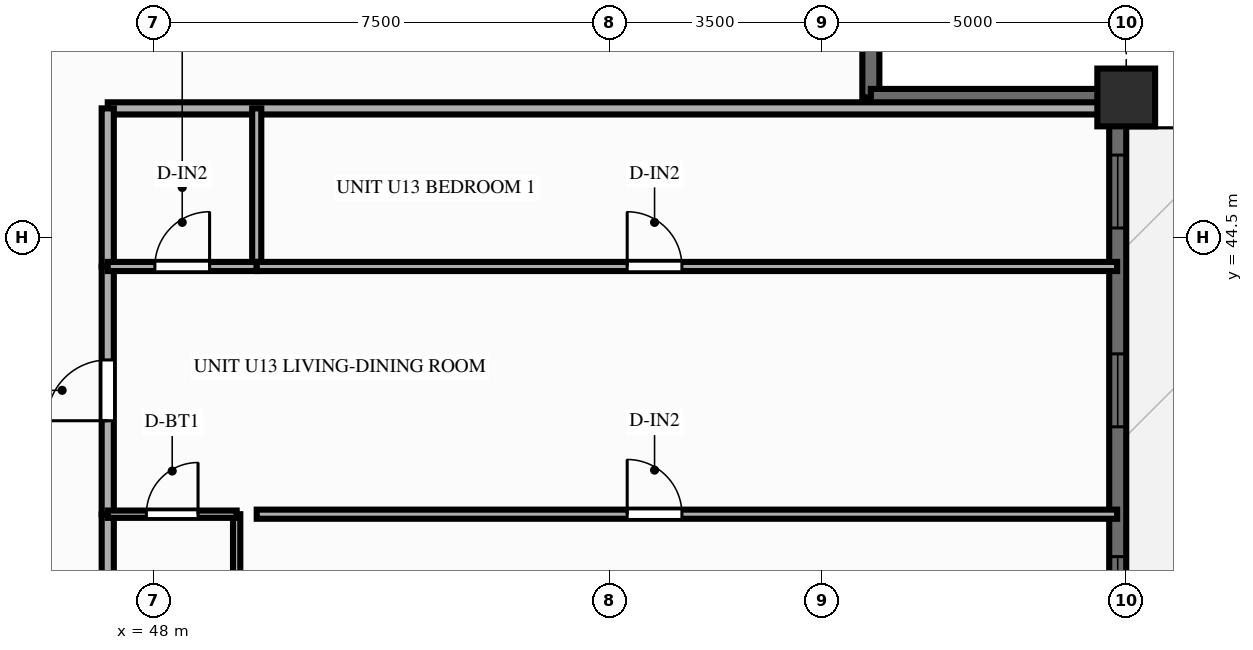
"""IFC4 building model, lengths in metres.
Left out: names, types, materials, properties, quantities, classifications, styles, units other than length and angle.
Written with IfcOpenShell. Run it as: python <this file> out.ifc"""

import sys

from ifc_helpers import new_model, si_unit, direction, frame, frame_2d, origin, origin_2d, place, context, subcontext, project, spatial, rectangle, extrude, source, transform, mapped, element, fill, save


model = new_model("IFC4")
c1 = context("Model", 3, precision=1e-05, world=origin(), true_north=direction((0.0, 1.0)))
c2 = subcontext(c1, "Body", "Model", "MODEL_VIEW")
j1 = project(units=[si_unit("LENGTHUNIT", "METRE"), si_unit("PLANEANGLEUNIT", "RADIAN")], contexts=[c1])
p1 = place(None, origin())
s1 = spatial("IfcSite", under=j1, at=p1, CompositionType="ELEMENT")
p2 = place(p1, origin())
s2 = spatial("IfcBuilding", under=s1, at=p2, CompositionType="ELEMENT")
p3 = place(p2, frame((0.0, 0.0, 104.85)))
s3 = spatial("IfcBuildingStorey", under=s2, at=p3, CompositionType="ELEMENT", Elevation=104.85)
m1 = source(origin(), c2, "Body", "SweptSolid", [
    extrude(rectangle(XDim=0.95, YDim=0.95, at=origin_2d()), origin(), (0.0, 0.0, 1.0), 3.0),
])
p4 = place(p3, frame((64.0, 46.8, 0.0), z_axis=(0.0, 0.0, 1.0), x_axis=(1.0, 0.0, 0.0)))
e1 = element("IfcColumn", 1, at=p4, inside=s3, PredefinedType="COLUMN", context=c2, shape_type="MappedRepresentation", body=[
    mapped(m1, transform((0.0, 0.0, 0.0), scale=1.0)),
])
p5 = place(p3, frame((63.86, 7.2, 0.0), z_axis=(0.0, 0.0, 1.0), x_axis=(0.0, 1.0, 0.0)))
e2 = element("IfcWall", 2, at=p5, inside=s3, PredefinedType="SOLIDWALL", context=c2, shape_type="SweptSolid", body=[
    extrude(rectangle(XDim=39.6, YDim=0.28, at=frame_2d((19.8, 0.0))), origin(), (0.0, 0.0, 1.0), 2.28),
])
p6 = place(p5, frame((0.945, 0.0, 0.25)))
e3 = element("IfcOpeningElement", 3, at=p6, cuts=e2, PredefinedType="OPENING", context=c2, shape_type="SweptSolid", body=[
    extrude(rectangle(XDim=1.2, YDim=1.5, at=frame_2d((0.6, 0.75))), frame((0.0, 0.152, 0.0), z_axis=(0.0, -1.0, 0.0), x_axis=(1.0, 0.0, 0.0)), (0.0, 0.0, 1.0), 0.304),
])
p7 = place(p5, frame((4.213, 0.0, 0.25)))
e4 = element("IfcOpeningElement", 4, at=p7, cuts=e2, PredefinedType="OPENING", context=c2, shape_type="SweptSolid", body=[
    extrude(rectangle(XDim=1.2, YDim=1.5, at=frame_2d((0.6, 0.75))), frame((0.0, 0.152, 0.0), z_axis=(0.0, -1.0, 0.0), x_axis=(1.0, 0.0, 0.0)), (0.0, 0.0, 1.0), 0.304),
])
p8 = place(p5, frame((7.55, 0.0, 0.25)))
e5 = element("IfcOpeningElement", 5, at=p8, cuts=e2, PredefinedType="OPENING", context=c2, shape_type="SweptSolid", body=[
    extrude(rectangle(XDim=1.2, YDim=1.5, at=frame_2d((0.6, 0.75))), frame((0.0, 0.152, 0.0), z_axis=(0.0, -1.0, 0.0), x_axis=(1.0, 0.0, 0.0)), (0.0, 0.0, 1.0), 0.304),
])
p9 = place(p5, frame((13.483, 0.0, 0.25)))
e6 = element("IfcOpeningElement", 6, at=p9, cuts=e2, PredefinedType="OPENING", context=c2, shape_type="SweptSolid", body=[
    extrude(rectangle(XDim=1.2, YDim=1.5, at=frame_2d((0.6, 0.75))), frame((0.0, 0.152, 0.0), z_axis=(0.0, -1.0, 0.0), x_axis=(1.0, 0.0, 0.0)), (0.0, 0.0, 1.0), 0.304),
])
p10 = place(p5, frame((16.82, 0.0, 0.25)))
e7 = element("IfcOpeningElement", 7, at=p10, cuts=e2, PredefinedType="OPENING", context=c2, shape_type="SweptSolid", body=[
    extrude(rectangle(XDim=1.2, YDim=1.5, at=frame_2d((0.6, 0.75))), frame((0.0, 0.152, 0.0), z_axis=(0.0, -1.0, 0.0), x_axis=(1.0, 0.0, 0.0)), (0.0, 0.0, 1.0), 0.304),
])
p11 = place(p5, frame((19.2, 0.0, 0.25)))
e8 = element("IfcOpeningElement", 8, at=p11, cuts=e2, PredefinedType="OPENING", context=c2, shape_type="SweptSolid", body=[
    extrude(rectangle(XDim=1.2, YDim=1.5, at=frame_2d((0.6, 0.75))), frame((0.0, 0.152, 0.0), z_axis=(0.0, -1.0, 0.0), x_axis=(1.0, 0.0, 0.0)), (0.0, 0.0, 1.0), 0.304),
])
p12 = place(p5, frame((21.578, 0.0, 0.25)))
e9 = element("IfcOpeningElement", 9, at=p12, cuts=e2, PredefinedType="OPENING", context=c2, shape_type="SweptSolid", body=[
    extrude(rectangle(XDim=1.2, YDim=1.5, at=frame_2d((0.6, 0.75))), frame((0.0, 0.152, 0.0), z_axis=(0.0, -1.0, 0.0), x_axis=(1.0, 0.0, 0.0)), (0.0, 0.0, 1.0), 0.304),
])
p13 = place(p5, frame((26.313, 0.0, 0.0), z_axis=(0.0, 0.0, 1.0), x_axis=(-1.0, 0.0, 0.0)))
e10 = element("IfcOpeningElement", 10, at=p13, cuts=e2, PredefinedType="OPENING", context=c2, shape_type="SweptSolid", body=[
    extrude(rectangle(XDim=1.6, YDim=2.15, at=frame_2d((0.8, 1.075))), frame((0.0, 0.152, 0.0), z_axis=(0.0, -1.0, 0.0), x_axis=(1.0, 0.0, 0.0)), (0.0, 0.0, 1.0), 0.304),
])
p14 = place(p5, frame((29.305, 0.0, 0.25)))
e11 = element("IfcOpeningElement", 11, at=p14, cuts=e2, PredefinedType="OPENING", context=c2, shape_type="SweptSolid", body=[
    extrude(rectangle(XDim=0.7, YDim=1.5, at=frame_2d((0.35, 0.75))), frame((0.0, 0.152, 0.0), z_axis=(0.0, -1.0, 0.0), x_axis=(1.0, 0.0, 0.0)), (0.0, 0.0, 1.0), 0.304),
])
p15 = place(p5, frame((30.848, 0.0, 0.25)))
e12 = element("IfcOpeningElement", 12, at=p15, cuts=e2, PredefinedType="OPENING", context=c2, shape_type="SweptSolid", body=[
    extrude(rectangle(XDim=1.2, YDim=1.5, at=frame_2d((0.6, 0.75))), frame((0.0, 0.152, 0.0), z_axis=(0.0, -1.0, 0.0), x_axis=(1.0, 0.0, 0.0)), (0.0, 0.0, 1.0), 0.304),
])
p16 = place(p5, frame((34.183, 0.0, 0.25)))
e13 = element("IfcOpeningElement", 13, at=p16, cuts=e2, PredefinedType="OPENING", context=c2, shape_type="SweptSolid", body=[
    extrude(rectangle(XDim=1.2, YDim=1.5, at=frame_2d((0.6, 0.75))), frame((0.0, 0.152, 0.0), z_axis=(0.0, -1.0, 0.0), x_axis=(1.0, 0.0, 0.0)), (0.0, 0.0, 1.0), 0.304),
])
p17 = place(p5, frame((37.452, 0.0, 0.25)))
e14 = element("IfcOpeningElement", 14, at=p17, cuts=e2, PredefinedType="OPENING", context=c2, shape_type="SweptSolid", body=[
    extrude(rectangle(XDim=1.2, YDim=1.5, at=frame_2d((0.6, 0.75))), frame((0.0, 0.152, 0.0), z_axis=(0.0, -1.0, 0.0), x_axis=(1.0, 0.0, 0.0)), (0.0, 0.0, 1.0), 0.304),
])
for number, where, z_axis, x_axis in (
    (15, (59.8, 46.8, 0.0), (0.0, 0.0, 1.0), (0.0, 1.0, 0.0)),
    (16, (59.8, 46.8, 0.0), (0.0, 0.0, 1.0), (1.0, 0.0, 0.0)),
):
    element("IfcWall", number, at=place(p3, frame(where, z_axis=z_axis, x_axis=x_axis)), inside=s3, PredefinedType="SOLIDWALL", context=c2, shape_type="SweptSolid", body=[
        extrude(rectangle(XDim=4.12, YDim=0.28, at=frame_2d((2.06, 0.0))), origin(), (0.0, 0.0, 1.0), 2.28),
    ])
p18 = place(p3, frame((47.25, 46.62, 0.0), z_axis=(0.0, 0.0, 1.0), x_axis=(1.0, 0.0, 0.0)))
e17 = element("IfcWall", 17, at=p18, inside=s3, PredefinedType="PARTITIONING", context=c2, shape_type="SweptSolid", body=[
    extrude(rectangle(XDim=16.6, YDim=0.2, at=frame_2d((8.3, 0.0))), origin(), (0.0, 0.0, 1.0), 2.79),
])
p19 = place(p3, frame((47.25, 37.35, 0.0), z_axis=(0.0, 0.0, 1.0), x_axis=(0.0, 1.0, 0.0)))
e18 = element("IfcWall", 18, at=p19, inside=s3, PredefinedType="PARTITIONING", context=c2, shape_type="SweptSolid", body=[
    extrude(rectangle(XDim=2.595, YDim=0.2, at=frame_2d((1.298, 0.0))), origin(), (0.0, 0.0, 1.0), 2.79),
])
p20 = place(p3, frame((47.25, 39.946, 0.0), z_axis=(0.0, 0.0, 1.0), x_axis=(0.0, 1.0, 0.0)))
e19 = element("IfcWall", 19, at=p20, inside=s3, PredefinedType="PARTITIONING", context=c2, shape_type="SweptSolid", body=[
    extrude(rectangle(XDim=4.074, YDim=0.2, at=frame_2d((2.037, 0.0))), origin(), (0.0, 0.0, 1.0), 2.79),
])
p21 = place(p20, frame((1.537, 0.0, 0.0)))
e20 = element("IfcOpeningElement", 20, at=p21, cuts=e19, PredefinedType="OPENING", context=c2, shape_type="SweptSolid", body=[
    extrude(rectangle(XDim=1.0, YDim=2.15, at=frame_2d((0.5, 1.075))), frame((0.0, 0.112, 0.0), z_axis=(0.0, -1.0, 0.0), x_axis=(1.0, 0.0, 0.0)), (0.0, 0.0, 1.0), 0.224),
])
p22 = place(p3, frame((47.25, 44.02, 0.0), z_axis=(0.0, 0.0, 1.0), x_axis=(0.0, 1.0, 0.0)))
e21 = element("IfcWall", 21, at=p22, inside=s3, PredefinedType="PARTITIONING", context=c2, shape_type="SweptSolid", body=[
    extrude(rectangle(XDim=2.6, YDim=0.2, at=frame_2d((1.3, 0.0))), origin(), (0.0, 0.0, 1.0), 2.79),
])
p23 = place(p3, frame((49.37, 37.35, 0.0), z_axis=(0.0, 0.0, 1.0), x_axis=(0.0, 1.0, 0.0)))
e22 = element("IfcWall", 22, at=p23, inside=s3, PredefinedType="PARTITIONING", context=c2, shape_type="SweptSolid", body=[
    extrude(rectangle(XDim=2.595, YDim=0.12, at=frame_2d((1.298, 0.0))), origin(), (0.0, 0.0, 1.0), 2.79),
])
p24 = place(p3, frame((49.7, 44.02, 0.0), z_axis=(0.0, 0.0, 1.0), x_axis=(0.0, 1.0, 0.0)))
e23 = element("IfcWall", 23, at=p24, inside=s3, PredefinedType="PARTITIONING", context=c2, shape_type="SweptSolid", body=[
    extrude(rectangle(XDim=2.6, YDim=0.15, at=frame_2d((1.3, 0.0))), origin(), (0.0, 0.0, 1.0), 2.79),
])
p25 = place(p3, frame((47.25, 39.946, 0.0), z_axis=(0.0, 0.0, 1.0), x_axis=(1.0, 0.0, 0.0)))
e24 = element("IfcWall", 24, at=p25, inside=s3, PredefinedType="PARTITIONING", context=c2, shape_type="SweptSolid", body=[
    extrude(rectangle(XDim=2.12, YDim=0.12, at=frame_2d((1.06, 0.0))), origin(), (0.0, 0.0, 1.0), 2.79),
])
p26 = place(p25, frame((0.635, 0.0, 0.0)))
e25 = element("IfcOpeningElement", 25, at=p26, cuts=e24, PredefinedType="OPENING", context=c2, shape_type="SweptSolid", body=[
    extrude(rectangle(XDim=0.85, YDim=2.05, at=frame_2d((0.425, 1.025))), frame((0.0, 0.072, 0.0), z_axis=(0.0, -1.0, 0.0), x_axis=(1.0, 0.0, 0.0)), (0.0, 0.0, 1.0), 0.144),
])
p27 = place(p3, frame((49.7, 39.946, 0.0), z_axis=(0.0, 0.0, 1.0), x_axis=(1.0, 0.0, 0.0)))
e26 = element("IfcWall", 26, at=p27, inside=s3, PredefinedType="PARTITIONING", context=c2, shape_type="SweptSolid", body=[
    extrude(rectangle(XDim=14.15, YDim=0.15, at=frame_2d((7.075, 0.0))), origin(), (0.0, 0.0, 1.0), 2.79),
])
p28 = place(p27, frame((6.093, 0.0, 0.0)))
e27 = element("IfcOpeningElement", 27, at=p28, cuts=e26, PredefinedType="OPENING", context=c2, shape_type="SweptSolid", body=[
    extrude(rectangle(XDim=0.9, YDim=2.1, at=frame_2d((0.45, 1.05))), frame((0.0, 0.087, 0.0), z_axis=(0.0, -1.0, 0.0), x_axis=(1.0, 0.0, 0.0)), (0.0, 0.0, 1.0), 0.174),
])
p29 = place(p3, frame((47.25, 44.02, 0.0), z_axis=(0.0, 0.0, 1.0), x_axis=(1.0, 0.0, 0.0)))
e28 = element("IfcWall", 28, at=p29, inside=s3, PredefinedType="PARTITIONING", context=c2, shape_type="SweptSolid", body=[
    extrude(rectangle(XDim=2.45, YDim=0.15, at=frame_2d((1.225, 0.0))), origin(), (0.0, 0.0, 1.0), 2.79),
])
p30 = place(p29, frame((0.775, 0.0, 0.0)))
e29 = element("IfcOpeningElement", 29, at=p30, cuts=e28, PredefinedType="OPENING", context=c2, shape_type="SweptSolid", body=[
    extrude(rectangle(XDim=0.9, YDim=2.1, at=frame_2d((0.45, 1.05))), frame((0.0, 0.087, 0.0), z_axis=(0.0, -1.0, 0.0), x_axis=(1.0, 0.0, 0.0)), (0.0, 0.0, 1.0), 0.174),
])
p31 = place(p3, frame((49.7, 44.02, 0.0), z_axis=(0.0, 0.0, 1.0), x_axis=(1.0, 0.0, 0.0)))
e30 = element("IfcWall", 30, at=p31, inside=s3, PredefinedType="PARTITIONING", context=c2, shape_type="SweptSolid", body=[
    extrude(rectangle(XDim=14.15, YDim=0.15, at=frame_2d((7.075, 0.0))), origin(), (0.0, 0.0, 1.0), 2.79),
])
p32 = place(p31, frame((6.093, 0.0, 0.0)))
e31 = element("IfcOpeningElement", 31, at=p32, cuts=e30, PredefinedType="OPENING", context=c2, shape_type="SweptSolid", body=[
    extrude(rectangle(XDim=0.9, YDim=2.1, at=frame_2d((0.45, 1.05))), frame((0.0, 0.087, 0.0), z_axis=(0.0, -1.0, 0.0), x_axis=(1.0, 0.0, 0.0)), (0.0, 0.0, 1.0), 0.174),
])
m2 = source(origin(), c2, "Body", "SweptSolid", [
    extrude(rectangle(XDim=1.2, YDim=1.5, at=frame_2d((0.6, 0.75))), frame((0.0, 0.03, 0.0), z_axis=(0.0, -1.0, 0.0), x_axis=(1.0, 0.0, 0.0)), (0.0, 0.0, 1.0), 0.06),
])
p33 = place(p15, origin())
e32 = element("IfcWindow", 32, at=p33, inside=s3, PartitioningType="SINGLE_PANEL", PredefinedType="WINDOW", context=c2, shape_type="MappedRepresentation", body=[
    mapped(m2, transform((0.0, 0.0, 0.0), scale=1.0)),
])
fill(e12, e32)
p34 = place(p16, origin())
e33 = element("IfcWindow", 33, at=p34, inside=s3, PartitioningType="SINGLE_PANEL", PredefinedType="WINDOW", context=c2, shape_type="MappedRepresentation", body=[
    mapped(m2, transform((0.0, 0.0, 0.0), scale=1.0)),
])
fill(e13, e33)
p35 = place(p17, origin())
e34 = element("IfcWindow", 34, at=p35, inside=s3, PartitioningType="SINGLE_PANEL", PredefinedType="WINDOW", context=c2, shape_type="MappedRepresentation", body=[
    mapped(m2, transform((0.0, 0.0, 0.0), scale=1.0)),
])
fill(e14, e34)
m3 = source(origin(), c2, "Body", "SweptSolid", [
    extrude(rectangle(XDim=1.0, YDim=2.15, at=frame_2d((0.5, 1.075))), frame((0.0, 0.025, 0.0), z_axis=(0.0, -1.0, 0.0), x_axis=(1.0, 0.0, 0.0)), (0.0, 0.0, 1.0), 0.05),
])
p36 = place(p21, origin())
e35 = element("IfcDoor", 35, at=p36, inside=s3, OperationType="SINGLE_SWING_LEFT", PredefinedType="DOOR", context=c2, shape_type="MappedRepresentation", body=[
    mapped(m3, transform((0.0, 0.0, 0.0), scale=1.0)),
])
fill(e20, e35)
m4 = source(origin(), c2, "Body", "SweptSolid", [
    extrude(rectangle(XDim=0.85, YDim=2.05, at=frame_2d((0.425, 1.025))), frame((0.0, 0.025, 0.0), z_axis=(0.0, -1.0, 0.0), x_axis=(1.0, 0.0, 0.0)), (0.0, 0.0, 1.0), 0.05),
])
p37 = place(p26, origin())
e36 = element("IfcDoor", 36, at=p37, inside=s3, OperationType="SINGLE_SWING_RIGHT", PredefinedType="DOOR", context=c2, shape_type="MappedRepresentation", body=[
    mapped(m4, transform((0.0, 0.0, 0.0), scale=1.0)),
])
fill(e25, e36)
m5 = source(origin(), c2, "Body", "SweptSolid", [
    extrude(rectangle(XDim=0.9, YDim=2.1, at=frame_2d((0.45, 1.05))), frame((0.0, 0.025, 0.0), z_axis=(0.0, -1.0, 0.0), x_axis=(1.0, 0.0, 0.0)), (0.0, 0.0, 1.0), 0.05),
])
p38 = place(p28, origin())
e37 = element("IfcDoor", 37, at=p38, inside=s3, OperationType="SINGLE_SWING_LEFT", PredefinedType="DOOR", context=c2, shape_type="MappedRepresentation", body=[
    mapped(m5, transform((0.0, 0.0, 0.0), scale=1.0)),
])
fill(e27, e37)
p39 = place(p30, origin())
e38 = element("IfcDoor", 38, at=p39, inside=s3, OperationType="SINGLE_SWING_RIGHT", PredefinedType="DOOR", context=c2, shape_type="MappedRepresentation", body=[
    mapped(m5, transform((0.0, 0.0, 0.0), scale=1.0)),
])
fill(e29, e38)
p40 = place(p32, origin())
e39 = element("IfcDoor", 39, at=p40, inside=s3, OperationType="SINGLE_SWING_LEFT", PredefinedType="DOOR", context=c2, shape_type="MappedRepresentation", body=[
    mapped(m5, transform((0.0, 0.0, 0.0), scale=1.0)),
])
fill(e31, e39)
save(model, sys.argv[1])
